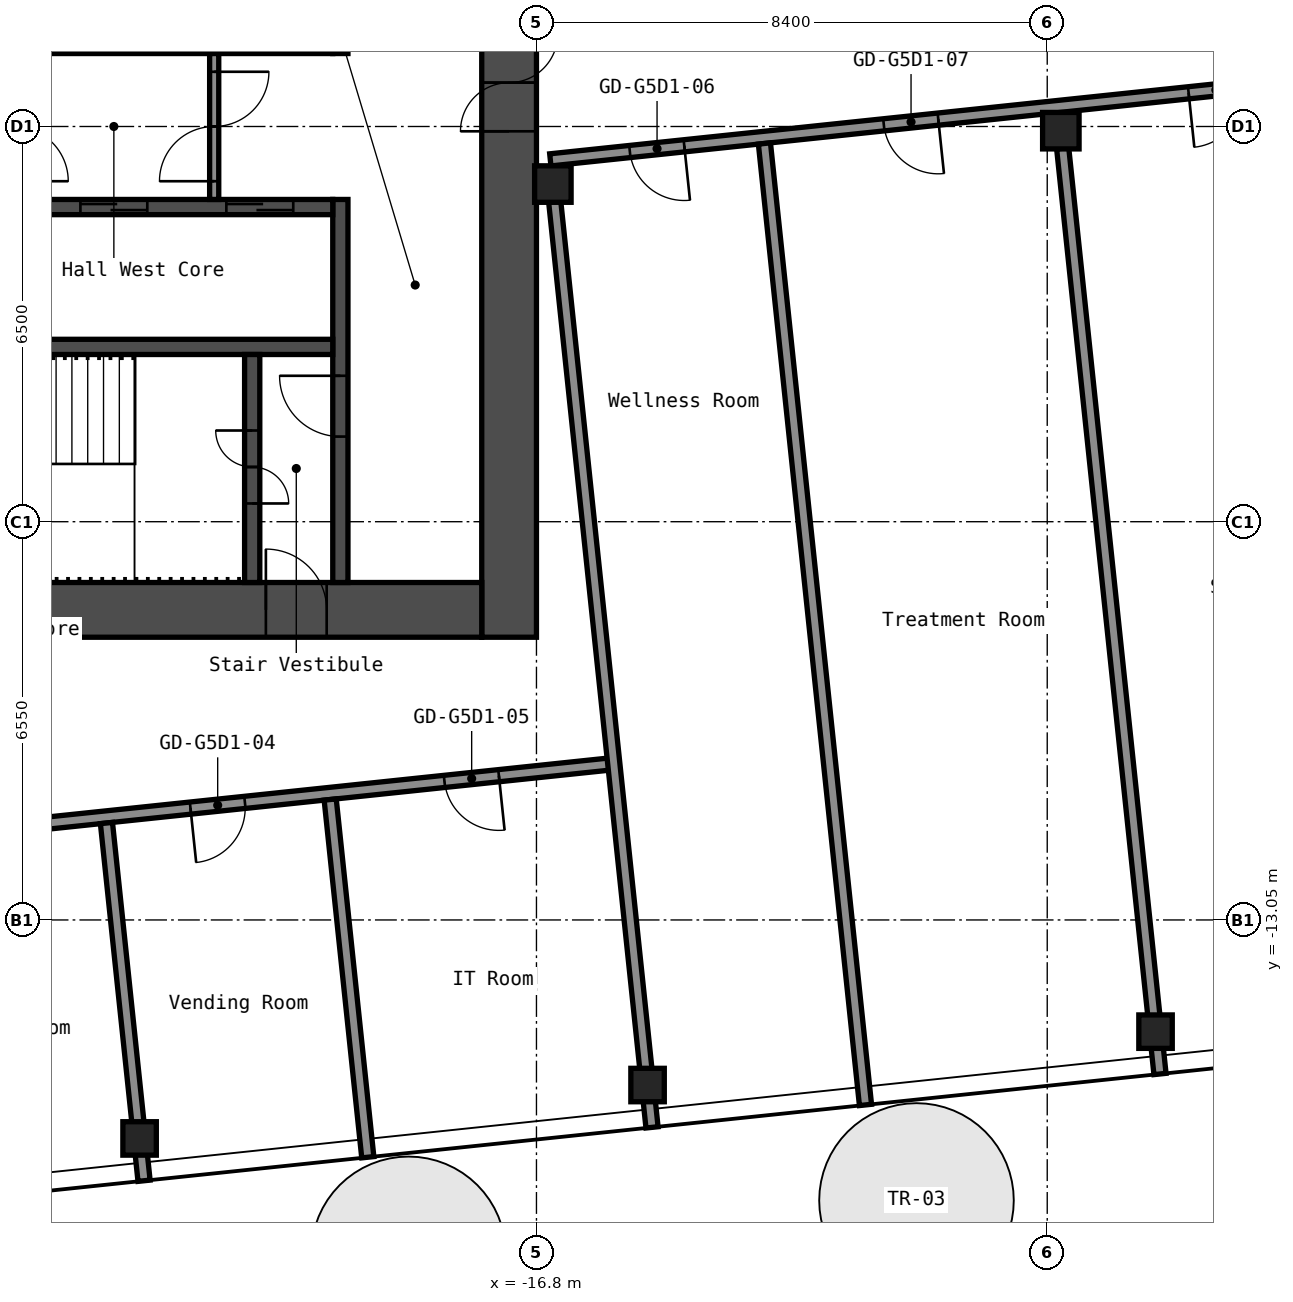
"""IFC4 building model, lengths in metres.
Left out: names, types, materials, properties, quantities, classifications, styles, units other than length and angle.
Written with IfcOpenShell. Run it as: python <this file> out.ifc"""

import sys

from ifc_helpers import new_model, si_unit, direction, frame, frame_2d, origin, origin_2d, place, context, subcontext, project, spatial, rectangle, hollow_rectangle, extrude, element, fill, save


model = new_model("IFC4")
c1 = context("Model", 3, precision=1e-05, world=origin(), true_north=direction((0.0, 1.0)))
c2 = subcontext(c1, "Body", "Model", "MODEL_VIEW")
j1 = project(units=[si_unit("LENGTHUNIT", "METRE"), si_unit("PLANEANGLEUNIT", "RADIAN")], contexts=[c1])
p1 = place(None, origin())
s1 = spatial("IfcSite", under=j1, at=p1, CompositionType="ELEMENT")
p2 = place(p1, origin())
s2 = spatial("IfcBuilding", under=s1, at=p2, CompositionType="ELEMENT")
p3 = place(p2, frame((0.0, 0.0, 261.4)))
s3 = spatial("IfcBuildingStorey", under=s2, at=p3, CompositionType="ELEMENT", Elevation=261.4)
for number, where, z_axis, x_axis in (
    (1, (-23.327, -16.643, 0.0), (0.0, 0.0, 1.0), (1.0, 0.0, 0.0)),
    (2, (-14.973, -15.765, 0.0), (0.0, 0.0, 1.0), (1.0, 0.0, 0.0)),
):
    element("IfcColumn", number, at=place(p3, frame(where, z_axis=z_axis, x_axis=x_axis)), inside=s3, PredefinedType="COLUMN", context=c2, shape_type="SweptSolid", body=[
        extrude(hollow_rectangle(XDim=0.55, YDim=0.55, WallThickness=0.022, InnerFilletRadius=0.033, OuterFilletRadius=0.055, at=origin_2d()), origin(), (0.0, 0.0, 1.0), 2.75),
    ])
p4 = place(p3, frame((-16.53, -0.947, 0.0), z_axis=(0.0, 0.0, 1.0), x_axis=(1.0, 0.0, 0.0)))
e3 = element("IfcColumn", 3, at=p4, inside=s3, PredefinedType="COLUMN", context=c2, shape_type="SweptSolid", body=[
    extrude(hollow_rectangle(XDim=0.6, YDim=0.6, WallThickness=0.025, InnerFilletRadius=0.038, OuterFilletRadius=0.062, at=origin_2d()), origin(), (0.0, 0.0, 1.0), 2.75),
])
p5 = place(p3, frame((-6.619, -14.887, 0.0), z_axis=(0.0, 0.0, 1.0), x_axis=(1.0, 0.0, 0.0)))
e4 = element("IfcColumn", 4, at=p5, inside=s3, PredefinedType="COLUMN", context=c2, shape_type="SweptSolid", body=[
    extrude(hollow_rectangle(XDim=0.55, YDim=0.55, WallThickness=0.022, InnerFilletRadius=0.033, OuterFilletRadius=0.055, at=origin_2d()), origin(), (0.0, 0.0, 1.0), 2.75),
])
p6 = place(p3, frame((-8.176, -0.069, 0.0), z_axis=(0.0, 0.0, 1.0), x_axis=(1.0, 0.0, 0.0)))
e5 = element("IfcColumn", 5, at=p6, inside=s3, PredefinedType="COLUMN", context=c2, shape_type="SweptSolid", body=[
    extrude(hollow_rectangle(XDim=0.6, YDim=0.6, WallThickness=0.025, InnerFilletRadius=0.038, OuterFilletRadius=0.062, at=origin_2d()), origin(), (0.0, 0.0, 1.0), 2.75),
])
p7 = place(p3, frame((-17.25, -8.4, 0.0), z_axis=(0.0, 0.0, 1.0), x_axis=(0.0, 1.0, 0.0)))
e6 = element("IfcWall", 6, at=p7, inside=s3, PredefinedType="SHEAR", context=c2, shape_type="SweptSolid", body=[
    extrude(rectangle(XDim=16.8, YDim=0.9, at=frame_2d((8.4, 0.0))), origin(), (0.0, 0.0, 1.0), 2.75),
])
p8 = place(p7, frame((8.321, 0.0, 0.0)))
e7 = element("IfcOpeningElement", 7, at=p8, cuts=e6, PredefinedType="OPENING", context=c2, shape_type="SweptSolid", body=[
    extrude(rectangle(XDim=1.6, YDim=2.1, at=frame_2d((0.8, 1.05))), frame((0.0, 0.46, 0.0), z_axis=(0.0, -1.0, 0.0), x_axis=(1.0, 0.0, 0.0)), (0.0, 0.0, 1.0), 0.92),
])
p9 = place(p3, frame((-32.7, -7.95, 0.0), z_axis=(0.0, 0.0, 1.0), x_axis=(1.0, 0.0, 0.0)))
e8 = element("IfcWall", 8, at=p9, inside=s3, PredefinedType="SHEAR", context=c2, shape_type="SweptSolid", body=[
    extrude(rectangle(XDim=15.0, YDim=0.9, at=frame_2d((7.5, 0.0))), origin(), (0.0, 0.0, 1.0), 2.75),
])
p10 = place(p9, frame((11.45, 0.0, 0.0)))
e9 = element("IfcOpeningElement", 9, at=p10, cuts=e8, PredefinedType="OPENING", context=c2, shape_type="SweptSolid", body=[
    extrude(rectangle(XDim=1.0, YDim=2.1, at=frame_2d((0.5, 1.05))), frame((0.0, 0.46, 0.0), z_axis=(0.0, -1.0, 0.0), x_axis=(1.0, 0.0, 0.0)), (0.0, 0.0, 1.0), 0.92),
])
p11 = place(p3, frame((-20.025, 1.2, 0.0), z_axis=(0.0, 0.0, 1.0), x_axis=(0.0, 1.0, 0.0)))
e10 = element("IfcWall", 10, at=p11, inside=s3, PredefinedType="SHEAR", context=c2, shape_type="SweptSolid", body=[
    extrude(rectangle(XDim=6.3, YDim=0.25, at=frame_2d((3.15, 0.0))), origin(), (0.0, 0.0, 1.0), 2.75),
])
p12 = place(p3, frame((-20.025, -7.5, 0.0), z_axis=(0.0, 0.0, 1.0), x_axis=(0.0, 1.0, 0.0)))
e11 = element("IfcWall", 11, at=p12, inside=s3, PredefinedType="SHEAR", context=c2, shape_type="SweptSolid", body=[
    extrude(rectangle(XDim=6.3, YDim=0.25, at=frame_2d((3.15, 0.0))), origin(), (0.0, 0.0, 1.0), 2.75),
])
p13 = place(p12, frame((2.4, 0.0, 0.0)))
e12 = element("IfcOpeningElement", 12, at=p13, cuts=e11, PredefinedType="OPENING", context=c2, shape_type="SweptSolid", body=[
    extrude(rectangle(XDim=1.0, YDim=2.1, at=frame_2d((0.5, 1.05))), frame((0.0, 0.135, 0.0), z_axis=(0.0, -1.0, 0.0), x_axis=(1.0, 0.0, 0.0)), (0.0, 0.0, 1.0), 0.27),
])
p14 = place(p3, frame((-27.65, 1.325, 0.0), z_axis=(0.0, 0.0, 1.0), x_axis=(1.0, 0.0, 0.0)))
e13 = element("IfcWall", 13, at=p14, inside=s3, PredefinedType="SHEAR", context=c2, shape_type="SweptSolid", body=[
    extrude(rectangle(XDim=7.5, YDim=0.25, at=frame_2d((3.75, 0.0))), origin(), (0.0, 0.0, 1.0), 2.75),
])
p15 = place(p14, frame((3.425, 0.0, 0.0)))
e14 = element("IfcOpeningElement", 14, at=p15, cuts=e13, PredefinedType="OPENING", context=c2, shape_type="SweptSolid", body=[
    extrude(rectangle(XDim=0.9, YDim=2.1, at=frame_2d((0.45, 1.05))), frame((0.0, 0.135, 0.0), z_axis=(0.0, -1.0, 0.0), x_axis=(1.0, 0.0, 0.0)), (0.0, 0.0, 1.0), 0.27),
])
p16 = place(p3, frame((-27.65, -1.325, 0.0), z_axis=(0.0, 0.0, 1.0), x_axis=(1.0, 0.0, 0.0)))
e15 = element("IfcWall", 15, at=p16, inside=s3, PredefinedType="SHEAR", context=c2, shape_type="SweptSolid", body=[
    extrude(rectangle(XDim=7.5, YDim=0.25, at=frame_2d((3.75, 0.0))), origin(), (0.0, 0.0, 1.0), 2.75),
])
p17 = place(p16, frame((5.75, 0.0, 0.0)))
e16 = element("IfcOpeningElement", 16, at=p17, cuts=e15, PredefinedType="OPENING", context=c2, shape_type="SweptSolid", body=[
    extrude(rectangle(XDim=1.1, YDim=2.1, at=frame_2d((0.55, 1.05))), frame((0.0, 0.135, 0.0), z_axis=(0.0, -1.0, 0.0), x_axis=(1.0, 0.0, 0.0)), (0.0, 0.0, 1.0), 0.27),
])
p18 = place(p16, frame((3.35, 0.0, 0.0)))
e17 = element("IfcOpeningElement", 17, at=p18, cuts=e15, PredefinedType="OPENING", context=c2, shape_type="SweptSolid", body=[
    extrude(rectangle(XDim=1.1, YDim=2.1, at=frame_2d((0.55, 1.05))), frame((0.0, 0.135, 0.0), z_axis=(0.0, -1.0, 0.0), x_axis=(1.0, 0.0, 0.0)), (0.0, 0.0, 1.0), 0.27),
])
p19 = place(p16, frame((0.95, 0.0, 0.0)))
e18 = element("IfcOpeningElement", 18, at=p19, cuts=e15, PredefinedType="OPENING", context=c2, shape_type="SweptSolid", body=[
    extrude(rectangle(XDim=1.1, YDim=2.1, at=frame_2d((0.55, 1.05))), frame((0.0, 0.135, 0.0), z_axis=(0.0, -1.0, 0.0), x_axis=(1.0, 0.0, 0.0)), (0.0, 0.0, 1.0), 0.27),
])
p20 = place(p3, frame((-27.65, -3.625, 0.0), z_axis=(0.0, 0.0, 1.0), x_axis=(1.0, 0.0, 0.0)))
e19 = element("IfcWall", 19, at=p20, inside=s3, PredefinedType="SHEAR", context=c2, shape_type="SweptSolid", body=[
    extrude(rectangle(XDim=7.5, YDim=0.25, at=frame_2d((3.75, 0.0))), origin(), (0.0, 0.0, 1.0), 2.75),
])
p21 = place(p3, frame((-21.475, -7.5, 0.0), z_axis=(0.0, 0.0, 1.0), x_axis=(0.0, 1.0, 0.0)))
e20 = element("IfcWall", 20, at=p21, inside=s3, PredefinedType="SHEAR", context=c2, shape_type="SweptSolid", body=[
    extrude(rectangle(XDim=3.75, YDim=0.25, at=frame_2d((1.875, 0.0))), origin(), (0.0, 0.0, 1.0), 2.75),
])
p22 = place(p21, frame((1.3, 0.0, 0.0)))
e21 = element("IfcOpeningElement", 21, at=p22, cuts=e20, PredefinedType="OPENING", context=c2, shape_type="SweptSolid", body=[
    extrude(rectangle(XDim=1.2, YDim=2.1, at=frame_2d((0.6, 1.05))), frame((0.0, 0.135, 0.0), z_axis=(0.0, -1.0, 0.0), x_axis=(1.0, 0.0, 0.0)), (0.0, 0.0, 1.0), 0.27),
])
p23 = place(p3, frame((-22.1, -1.2, 0.0), z_axis=(0.0, 0.0, 1.0), x_axis=(0.0, 1.0, 0.0)))
e22 = element("IfcWall", 22, at=p23, inside=s3, PredefinedType="PARTITIONING", context=c2, shape_type="SweptSolid", body=[
    extrude(rectangle(XDim=2.4, YDim=0.15, at=frame_2d((1.2, 0.0))), origin(), (0.0, 0.0, 1.0), 2.75),
])
p24 = place(p23, frame((0.3, 0.0, 0.0)))
e23 = element("IfcOpeningElement", 23, at=p24, cuts=e22, PredefinedType="OPENING", context=c2, shape_type="SweptSolid", body=[
    extrude(rectangle(XDim=1.8, YDim=2.1, at=frame_2d((0.9, 1.05))), frame((0.0, 0.085, 0.0), z_axis=(0.0, -1.0, 0.0), x_axis=(1.0, 0.0, 0.0)), (0.0, 0.0, 1.0), 0.17),
])
p25 = place(p3, frame((-36.712, -12.705, 0.0), z_axis=(0.0, 0.0, 1.0), x_axis=(0.994522460242, 0.104523088709, 0.0)))
e24 = element("IfcWall", 24, at=p25, inside=s3, PredefinedType="PARTITIONING", context=c2, shape_type="SweptSolid", body=[
    extrude(rectangle(XDim=21.3, YDim=0.2, at=frame_2d((10.65, 0.0))), origin(), (0.0, 0.0, 1.0), 2.75),
])
p26 = place(p25, frame((1.95, 0.0, 0.0)))
e25 = element("IfcOpeningElement", 25, at=p26, cuts=e24, PredefinedType="OPENING", context=c2, shape_type="SweptSolid", body=[
    extrude(rectangle(XDim=0.9, YDim=2.1, at=frame_2d((0.45, 1.05))), frame((0.0, 0.11, 0.0), z_axis=(0.0, -1.0, 0.0), x_axis=(1.0, 0.0, 0.0)), (0.0, 0.0, 1.0), 0.22),
])
p27 = place(p25, frame((5.98, 0.0, 0.0)))
e26 = element("IfcOpeningElement", 26, at=p27, cuts=e24, PredefinedType="OPENING", context=c2, shape_type="SweptSolid", body=[
    extrude(rectangle(XDim=0.9, YDim=2.1, at=frame_2d((0.45, 1.05))), frame((0.0, 0.11, 0.0), z_axis=(0.0, -1.0, 0.0), x_axis=(1.0, 0.0, 0.0)), (0.0, 0.0, 1.0), 0.22),
])
p28 = place(p25, frame((10.18, 0.0, 0.0)))
e27 = element("IfcOpeningElement", 27, at=p28, cuts=e24, PredefinedType="OPENING", context=c2, shape_type="SweptSolid", body=[
    extrude(rectangle(XDim=0.9, YDim=2.1, at=frame_2d((0.45, 1.05))), frame((0.0, 0.11, 0.0), z_axis=(0.0, -1.0, 0.0), x_axis=(1.0, 0.0, 0.0)), (0.0, 0.0, 1.0), 0.22),
])
p29 = place(p25, frame((14.3, 0.0, 0.0)))
e28 = element("IfcOpeningElement", 28, at=p29, cuts=e24, PredefinedType="OPENING", context=c2, shape_type="SweptSolid", body=[
    extrude(rectangle(XDim=0.9, YDim=2.1, at=frame_2d((0.45, 1.05))), frame((0.0, 0.11, 0.0), z_axis=(0.0, -1.0, 0.0), x_axis=(1.0, 0.0, 0.0)), (0.0, 0.0, 1.0), 0.22),
])
p30 = place(p25, frame((18.5, 0.0, 0.0)))
e29 = element("IfcOpeningElement", 29, at=p30, cuts=e24, PredefinedType="OPENING", context=c2, shape_type="SweptSolid", body=[
    extrude(rectangle(XDim=0.9, YDim=2.1, at=frame_2d((0.45, 1.05))), frame((0.0, 0.11, 0.0), z_axis=(0.0, -1.0, 0.0), x_axis=(1.0, 0.0, 0.0)), (0.0, 0.0, 1.0), 0.22),
])
p31 = place(p3, frame((-16.572, -0.549, 0.0), z_axis=(0.0, 0.0, 1.0), x_axis=(0.994521146831, 0.104535584879, 0.0)))
e30 = element("IfcWall", 30, at=p31, inside=s3, PredefinedType="PARTITIONING", context=c2, shape_type="SweptSolid", body=[
    extrude(rectangle(XDim=33.561, YDim=0.2, at=frame_2d((16.78, 0.0))), origin(), (0.0, 0.0, 1.0), 2.75),
])
p32 = place(p31, frame((1.315, 0.0, 0.0)))
e31 = element("IfcOpeningElement", 31, at=p32, cuts=e30, PredefinedType="OPENING", context=c2, shape_type="SweptSolid", body=[
    extrude(rectangle(XDim=0.9, YDim=2.1, at=frame_2d((0.45, 1.05))), frame((0.0, 0.11, 0.0), z_axis=(0.0, -1.0, 0.0), x_axis=(1.0, 0.0, 0.0)), (0.0, 0.0, 1.0), 0.22),
])
p33 = place(p31, frame((5.515, 0.0, 0.0)))
e32 = element("IfcOpeningElement", 32, at=p33, cuts=e30, PredefinedType="OPENING", context=c2, shape_type="SweptSolid", body=[
    extrude(rectangle(XDim=0.9, YDim=2.1, at=frame_2d((0.45, 1.05))), frame((0.0, 0.11, 0.0), z_axis=(0.0, -1.0, 0.0), x_axis=(1.0, 0.0, 0.0)), (0.0, 0.0, 1.0), 0.22),
])
p34 = place(p31, frame((10.555, 0.0, 0.0)))
e33 = element("IfcOpeningElement", 33, at=p34, cuts=e30, PredefinedType="OPENING", context=c2, shape_type="SweptSolid", body=[
    extrude(rectangle(XDim=0.9, YDim=2.1, at=frame_2d((0.45, 1.05))), frame((0.0, 0.11, 0.0), z_axis=(0.0, -1.0, 0.0), x_axis=(1.0, 0.0, 0.0)), (0.0, 0.0, 1.0), 0.22),
])
p35 = place(p31, frame((14.755, 0.0, 0.0)))
e34 = element("IfcOpeningElement", 34, at=p35, cuts=e30, PredefinedType="OPENING", context=c2, shape_type="SweptSolid", body=[
    extrude(rectangle(XDim=0.9, YDim=2.1, at=frame_2d((0.45, 1.05))), frame((0.0, 0.11, 0.0), z_axis=(0.0, -1.0, 0.0), x_axis=(1.0, 0.0, 0.0)), (0.0, 0.0, 1.0), 0.22),
])
p36 = place(p31, frame((19.65, 0.0, 0.0)))
e35 = element("IfcOpeningElement", 35, at=p36, cuts=e30, PredefinedType="OPENING", context=c2, shape_type="SweptSolid", body=[
    extrude(rectangle(XDim=1.0, YDim=2.1, at=frame_2d((0.5, 1.05))), frame((0.0, 0.11, 0.0), z_axis=(0.0, -1.0, 0.0), x_axis=(1.0, 0.0, 0.0)), (0.0, 0.0, 1.0), 0.22),
])
p37 = place(p31, frame((21.35, 0.0, 0.0)))
e36 = element("IfcOpeningElement", 36, at=p37, cuts=e30, PredefinedType="OPENING", context=c2, shape_type="SweptSolid", body=[
    extrude(rectangle(XDim=1.0, YDim=2.1, at=frame_2d((0.5, 1.05))), frame((0.0, 0.11, 0.0), z_axis=(0.0, -1.0, 0.0), x_axis=(1.0, 0.0, 0.0)), (0.0, 0.0, 1.0), 0.22),
])
p38 = place(p31, frame((27.185, 0.0, 0.0)))
e37 = element("IfcOpeningElement", 37, at=p38, cuts=e30, PredefinedType="OPENING", context=c2, shape_type="SweptSolid", body=[
    extrude(rectangle(XDim=0.9, YDim=2.1, at=frame_2d((0.45, 1.05))), frame((0.0, 0.11, 0.0), z_axis=(0.0, -1.0, 0.0), x_axis=(1.0, 0.0, 0.0)), (0.0, 0.0, 1.0), 0.22),
])
p39 = place(p31, frame((31.385, 0.0, 0.0)))
e38 = element("IfcOpeningElement", 38, at=p39, cuts=e30, PredefinedType="OPENING", context=c2, shape_type="SweptSolid", body=[
    extrude(rectangle(XDim=0.9, YDim=2.1, at=frame_2d((0.45, 1.05))), frame((0.0, 0.11, 0.0), z_axis=(0.0, -1.0, 0.0), x_axis=(1.0, 0.0, 0.0)), (0.0, 0.0, 1.0), 0.22),
])
p40 = place(p3, frame((-23.254, -17.339, 0.0), z_axis=(0.0, 0.0, 1.0), x_axis=(-0.10453655107, 0.994521045273, 0.0)))
e39 = element("IfcWall", 39, at=p40, inside=s3, PredefinedType="PARTITIONING", context=c2, shape_type="SweptSolid", body=[
    extrude(rectangle(XDim=5.916, YDim=0.2, at=frame_2d((2.958, 0.0))), origin(), (0.0, 0.0, 1.0), 2.75),
])
p41 = place(p3, frame((-19.574, -16.953, 0.0), z_axis=(0.0, 0.0, 1.0), x_axis=(-0.104491443182, 0.994525785639, 0.0)))
e40 = element("IfcWall", 40, at=p41, inside=s3, PredefinedType="PARTITIONING", context=c2, shape_type="SweptSolid", body=[
    extrude(rectangle(XDim=5.916, YDim=0.2, at=frame_2d((2.958, 0.0))), origin(), (0.0, 0.0, 1.0), 2.75),
])
p42 = place(p3, frame((-14.9, -16.461, 0.0), z_axis=(0.0, 0.0, 1.0), x_axis=(-0.104523729364, 0.99452239291, 0.0)))
e41 = element("IfcWall", 41, at=p42, inside=s3, PredefinedType="PARTITIONING", context=c2, shape_type="SweptSolid", body=[
    extrude(rectangle(XDim=15.308, YDim=0.2, at=frame_2d((7.654, 0.0))), origin(), (0.0, 0.0, 1.0), 2.75),
])
p43 = place(p3, frame((-11.389, -16.092, 0.0), z_axis=(0.0, 0.0, 1.0), x_axis=(-0.104536114326, 0.99452109118, 0.0)))
e42 = element("IfcWall", 42, at=p43, inside=s3, PredefinedType="PARTITIONING", context=c2, shape_type="SweptSolid", body=[
    extrude(rectangle(XDim=15.9, YDim=0.2, at=frame_2d((7.95, 0.0))), origin(), (0.0, 0.0, 1.0), 2.75),
])
p44 = place(p3, frame((-6.546, -15.583, 0.0), z_axis=(0.0, 0.0, 1.0), x_axis=(-0.104523729364, 0.99452239291, 0.0)))
e43 = element("IfcWall", 43, at=p44, inside=s3, PredefinedType="PARTITIONING", context=c2, shape_type="SweptSolid", body=[
    extrude(rectangle(XDim=15.308, YDim=0.2, at=frame_2d((7.654, 0.0))), origin(), (0.0, 0.0, 1.0), 2.75),
])
p45 = place(p8, origin())
e44 = element("IfcDoor", 44, at=p45, inside=s3, OperationType="DOUBLE_DOOR_SINGLE_SWING", PredefinedType="DOOR", context=c2, shape_type="SweptSolid", body=[
    extrude(rectangle(XDim=1.6, YDim=2.1, at=frame_2d((0.8, 1.05))), frame((0.0, 0.025, 0.0), z_axis=(0.0, -1.0, 0.0), x_axis=(1.0, 0.0, 0.0)), (0.0, 0.0, 1.0), 0.05),
])
fill(e7, e44)
p46 = place(p10, origin())
e45 = element("IfcDoor", 45, at=p46, inside=s3, OperationType="SINGLE_SWING_RIGHT", PredefinedType="DOOR", context=c2, shape_type="SweptSolid", body=[
    extrude(rectangle(XDim=1.0, YDim=2.1, at=frame_2d((0.5, 1.05))), frame((0.0, 0.025, 0.0), z_axis=(0.0, -1.0, 0.0), x_axis=(1.0, 0.0, 0.0)), (0.0, 0.0, 1.0), 0.05),
])
fill(e9, e45)
p47 = place(p22, origin())
e46 = element("IfcDoor", 46, at=p47, inside=s3, OperationType="DOUBLE_DOOR_SINGLE_SWING", PredefinedType="DOOR", context=c2, shape_type="SweptSolid", body=[
    extrude(rectangle(XDim=1.2, YDim=2.1, at=frame_2d((0.6, 1.05))), frame((0.0, 0.025, 0.0), z_axis=(0.0, -1.0, 0.0), x_axis=(1.0, 0.0, 0.0)), (0.0, 0.0, 1.0), 0.05),
])
fill(e21, e46)
p48 = place(p13, origin())
e47 = element("IfcDoor", 47, at=p48, inside=s3, OperationType="SINGLE_SWING_LEFT", PredefinedType="DOOR", context=c2, shape_type="SweptSolid", body=[
    extrude(rectangle(XDim=1.0, YDim=2.1, at=frame_2d((0.5, 1.05))), frame((0.0, 0.025, 0.0), z_axis=(0.0, -1.0, 0.0), x_axis=(1.0, 0.0, 0.0)), (0.0, 0.0, 1.0), 0.05),
])
fill(e12, e47)
p49 = place(p24, origin())
e48 = element("IfcDoor", 48, at=p49, inside=s3, OperationType="DOUBLE_DOOR_SINGLE_SWING", PredefinedType="DOOR", context=c2, shape_type="SweptSolid", body=[
    extrude(rectangle(XDim=1.8, YDim=2.1, at=frame_2d((0.9, 1.05))), frame((0.0, 0.025, 0.0), z_axis=(0.0, -1.0, 0.0), x_axis=(1.0, 0.0, 0.0)), (0.0, 0.0, 1.0), 0.05),
])
fill(e23, e48)
p50 = place(p17, origin())
e49 = element("IfcDoor", 49, at=p50, inside=s3, OperationType="DOUBLE_DOOR_SLIDING", PredefinedType="DOOR", context=c2, shape_type="SweptSolid", body=[
    extrude(rectangle(XDim=1.1, YDim=2.1, at=frame_2d((0.55, 1.05))), frame((0.0, 0.025, 0.0), z_axis=(0.0, -1.0, 0.0), x_axis=(1.0, 0.0, 0.0)), (0.0, 0.0, 1.0), 0.05),
])
fill(e16, e49)
p51 = place(p18, origin())
e50 = element("IfcDoor", 50, at=p51, inside=s3, OperationType="DOUBLE_DOOR_SLIDING", PredefinedType="DOOR", context=c2, shape_type="SweptSolid", body=[
    extrude(rectangle(XDim=1.1, YDim=2.1, at=frame_2d((0.55, 1.05))), frame((0.0, 0.025, 0.0), z_axis=(0.0, -1.0, 0.0), x_axis=(1.0, 0.0, 0.0)), (0.0, 0.0, 1.0), 0.05),
])
fill(e17, e50)
p52 = place(p29, origin())
e51 = element("IfcDoor", 51, at=p52, inside=s3, OperationType="SINGLE_SWING_LEFT", PredefinedType="DOOR", context=c2, shape_type="SweptSolid", body=[
    extrude(rectangle(XDim=0.9, YDim=2.1, at=frame_2d((0.45, 1.05))), frame((0.0, 0.025, 0.0), z_axis=(0.0, -1.0, 0.0), x_axis=(1.0, 0.0, 0.0)), (0.0, 0.0, 1.0), 0.05),
])
fill(e28, e51)
p53 = place(p30, origin())
e52 = element("IfcDoor", 52, at=p53, inside=s3, OperationType="SINGLE_SWING_RIGHT", PredefinedType="DOOR", context=c2, shape_type="SweptSolid", body=[
    extrude(rectangle(XDim=0.9, YDim=2.1, at=frame_2d((0.45, 1.05))), frame((0.0, 0.025, 0.0), z_axis=(0.0, -1.0, 0.0), x_axis=(1.0, 0.0, 0.0)), (0.0, 0.0, 1.0), 0.05),
])
fill(e29, e52)
p54 = place(p32, origin())
e53 = element("IfcDoor", 53, at=p54, inside=s3, OperationType="SINGLE_SWING_RIGHT", PredefinedType="DOOR", context=c2, shape_type="SweptSolid", body=[
    extrude(rectangle(XDim=0.9, YDim=2.1, at=frame_2d((0.45, 1.05))), frame((0.0, 0.025, 0.0), z_axis=(0.0, -1.0, 0.0), x_axis=(1.0, 0.0, 0.0)), (0.0, 0.0, 1.0), 0.05),
])
fill(e31, e53)
p55 = place(p33, origin())
e54 = element("IfcDoor", 54, at=p55, inside=s3, OperationType="SINGLE_SWING_RIGHT", PredefinedType="DOOR", context=c2, shape_type="SweptSolid", body=[
    extrude(rectangle(XDim=0.9, YDim=2.1, at=frame_2d((0.45, 1.05))), frame((0.0, 0.025, 0.0), z_axis=(0.0, -1.0, 0.0), x_axis=(1.0, 0.0, 0.0)), (0.0, 0.0, 1.0), 0.05),
])
fill(e32, e54)
p56 = place(p34, origin())
e55 = element("IfcDoor", 55, at=p56, inside=s3, OperationType="SINGLE_SWING_LEFT", PredefinedType="DOOR", context=c2, shape_type="SweptSolid", body=[
    extrude(rectangle(XDim=0.9, YDim=2.1, at=frame_2d((0.45, 1.05))), frame((0.0, 0.025, 0.0), z_axis=(0.0, -1.0, 0.0), x_axis=(1.0, 0.0, 0.0)), (0.0, 0.0, 1.0), 0.05),
])
fill(e33, e55)
save(model, sys.argv[1])
